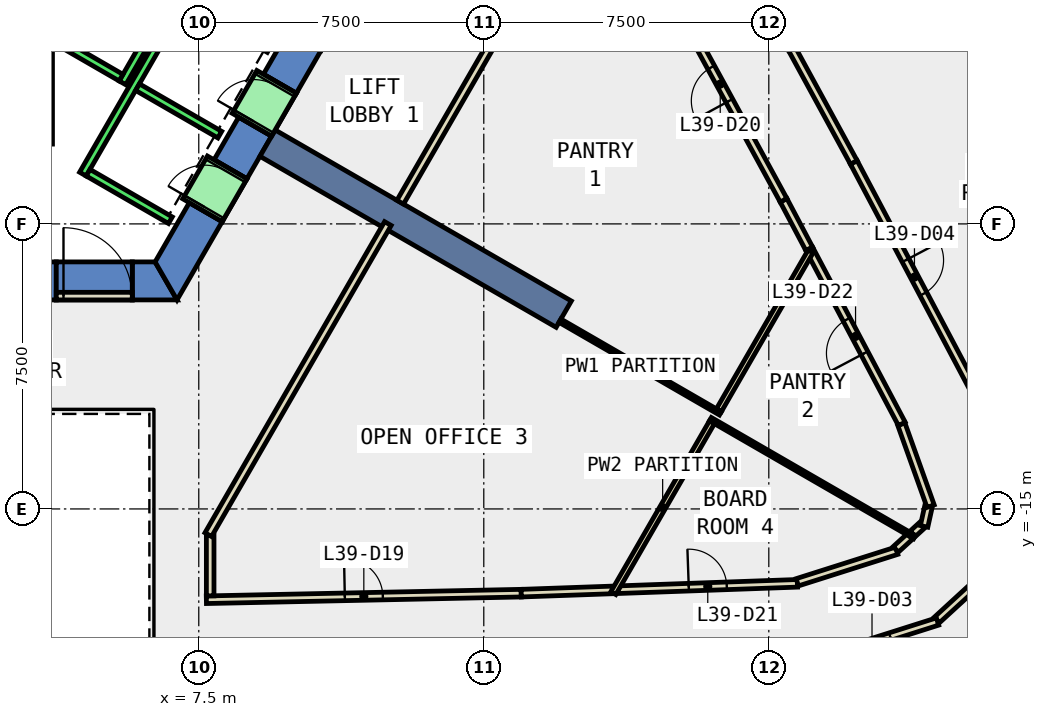
"""IFC4 building model, lengths in metres.
Left out: names, types, materials, properties, quantities, classifications, styles, units other than length and angle.
Written with IfcOpenShell. Run it as: python <this file> out.ifc"""

import sys

from ifc_helpers import new_model, si_unit, direction, frame, frame_2d, origin, place, context, subcontext, project, spatial, polyline, rectangle, outline, extrude, element, fill, save


model = new_model("IFC4")
c1 = context("Model", 3, precision=1e-05, world=origin(), true_north=direction((0.0, 1.0)))
c2 = subcontext(c1, "Body", "Model", "MODEL_VIEW")
j1 = project(units=[si_unit("LENGTHUNIT", "METRE"), si_unit("PLANEANGLEUNIT", "RADIAN")], contexts=[c1])
p1 = place(None, origin())
s1 = spatial("IfcSite", under=j1, at=p1, CompositionType="ELEMENT")
p2 = place(p1, origin())
s2 = spatial("IfcBuilding", under=s1, at=p2, CompositionType="ELEMENT")
p3 = place(p2, frame((0.0, 0.0, 176.0)))
s3 = spatial("IfcBuildingStorey", under=s2, at=p3, CompositionType="ELEMENT", Elevation=176.0)
p4 = place(p3, frame((0.0, 0.0, -0.4)))
e1 = element("IfcWall", 1, at=p4, inside=s3, PredefinedType="SHEAR", context=c2, shape_type="SweptSolid", body=[
    extrude(outline(polyline([(3.75, -9.5), (3.75, -8.5), (-6.351, -8.5), (-6.928, -9.5), (3.75, -9.5)])), origin(), (0.0, 0.0, 1.0), 4.2),
])
p5 = place(p3, frame((0.0, 0.0, -0.4)))
e2 = element("IfcWall", 2, at=p5, inside=s3, PredefinedType="SHEAR", context=c2, shape_type="SweptSolid", body=[
    extrude(outline(polyline([(5.75, -8.5), (5.75, -9.5), (6.928, -9.5), (6.351, -8.5), (5.75, -8.5)])), origin(), (0.0, 0.0, 1.0), 4.2),
])
p6 = place(p3, frame((0.0, 0.0, 3.6)))
e3 = element("IfcWall", 3, at=p6, inside=s3, PredefinedType="SHEAR", context=c2, shape_type="SweptSolid", body=[
    extrude(outline(polyline([(5.75, -9.5), (5.75, -8.5), (3.75, -8.5), (3.75, -9.5), (5.75, -9.5)])), origin(), (0.0, 0.0, 1.0), 0.2),
])
p7 = place(p3, frame((0.0, 0.0, -0.4)))
e4 = element("IfcWall", 4, at=p7, inside=s3, PredefinedType="SHEAR", context=c2, shape_type="SweptSolid", body=[
    extrude(outline(polyline([(8.117, -7.44), (7.252, -6.94), (6.351, -8.5), (6.928, -9.5), (8.117, -7.44)])), origin(), (0.0, 0.0, 1.0), 4.2),
])
p8 = place(p3, frame((0.0, 0.0, -0.4)))
e5 = element("IfcWall", 5, at=p8, inside=s3, PredefinedType="SHEAR", context=c2, shape_type="SweptSolid", body=[
    extrude(outline(polyline([(9.417, -5.189), (8.551, -4.689), (7.902, -5.814), (8.767, -6.314), (9.417, -5.189)])), origin(), (0.0, 0.0, 1.0), 4.2),
])
p9 = place(p3, frame((0.0, 0.0, -0.4)))
e6 = element("IfcWall", 6, at=p9, inside=s3, PredefinedType="SHEAR", context=c2, shape_type="SweptSolid", body=[
    extrude(outline(polyline([(10.717, -2.937), (9.851, -2.437), (9.201, -3.563), (10.067, -4.063), (10.717, -2.937)])), origin(), (0.0, 0.0, 1.0), 4.2),
])
p10 = place(p3, frame((0.0, 0.0, 3.6)))
e7 = element("IfcWall", 7, at=p10, inside=s3, PredefinedType="SHEAR", context=c2, shape_type="SweptSolid", body=[
    extrude(outline(polyline([(8.767, -6.314), (7.902, -5.814), (7.252, -6.94), (8.117, -7.44), (8.767, -6.314)])), origin(), (0.0, 0.0, 1.0), 0.2),
])
p11 = place(p3, frame((0.0, 0.0, 3.6)))
e8 = element("IfcWall", 8, at=p11, inside=s3, PredefinedType="SHEAR", context=c2, shape_type="SweptSolid", body=[
    extrude(outline(polyline([(10.067, -4.063), (9.201, -3.563), (8.551, -4.689), (9.417, -5.189), (10.067, -4.063)])), origin(), (0.0, 0.0, 1.0), 0.2),
])
p12 = place(p3, frame((9.31, -5.375, -0.4), z_axis=(0.0, 0.0, 1.0), x_axis=(0.866017533419, -0.500013631625, 0.0)))
e9 = element("IfcWall", 9, at=p12, inside=s3, PredefinedType="SHEAR", context=c2, shape_type="SweptSolid", body=[
    extrude(rectangle(XDim=9.0, YDim=0.8, at=frame_2d((4.5, 0.0))), origin(), (0.0, 0.0, 1.0), 4.2),
])
p13 = place(p3, frame((7.7, -17.389, 0.0), z_axis=(0.0, 0.0, 1.0), x_axis=(0.999782442794, 0.020858261713, 0.0)))
e10 = element("IfcWall", 10, at=p13, inside=s3, PredefinedType="PARTITIONING", context=c2, shape_type="SweptSolid", body=[
    extrude(rectangle(XDim=8.287, YDim=0.2, at=frame_2d((4.144, 0.0))), origin(), (0.0, 0.0, 1.0), 3.75),
])
p14 = place(p13, frame((3.644, 0.0, 0.0)))
e11 = element("IfcOpeningElement", 11, at=p14, cuts=e10, PredefinedType="OPENING", context=c2, shape_type="SweptSolid", body=[
    extrude(rectangle(XDim=1.0, YDim=2.1, at=frame_2d((0.5, 1.05))), frame((0.0, 0.11, 0.0), z_axis=(0.0, -1.0, 0.0), x_axis=(1.0, 0.0, 0.0)), (0.0, 0.0, 1.0), 0.22),
])
p15 = place(p3, frame((15.985, -17.216, 0.0), z_axis=(0.0, 0.0, 1.0), x_axis=(0.999373434249, 0.035394052017, 0.0)))
e12 = element("IfcWall", 12, at=p15, inside=s3, PredefinedType="PARTITIONING", context=c2, shape_type="SweptSolid", body=[
    extrude(rectangle(XDim=2.4, YDim=0.2, at=frame_2d((1.2, 0.0))), origin(), (0.0, 0.0, 1.0), 3.75),
])
p16 = place(p3, frame((23.565, -8.158, 0.0), z_axis=(0.0, 0.0, 1.0), x_axis=(-0.46753134131, 0.883976495668, 0.0)))
e13 = element("IfcWall", 13, at=p16, inside=s3, PredefinedType="PARTITIONING", context=c2, shape_type="SweptSolid", body=[
    extrude(rectangle(XDim=1.448, YDim=0.2, at=frame_2d((0.724, 0.0))), origin(), (0.0, 0.0, 1.0), 3.75),
])
p17 = place(p3, frame((22.888, -6.878, 0.0), z_axis=(0.0, 0.0, 1.0), x_axis=(-0.478665365973, 0.877997418799, 0.0)))
e14 = element("IfcWall", 14, at=p17, inside=s3, PredefinedType="PARTITIONING", context=c2, shape_type="SweptSolid", body=[
    extrude(rectangle(XDim=6.961, YDim=0.2, at=frame_2d((3.48, 0.0))), origin(), (0.0, 0.0, 1.0), 3.75),
])
p18 = place(p17, frame((2.981, 0.0, 0.0)))
e15 = element("IfcOpeningElement", 15, at=p18, cuts=e14, PredefinedType="OPENING", context=c2, shape_type="SweptSolid", body=[
    extrude(rectangle(XDim=1.0, YDim=2.1, at=frame_2d((0.5, 1.05))), frame((0.0, 0.11, 0.0), z_axis=(0.0, -1.0, 0.0), x_axis=(1.0, 0.0, 0.0)), (0.0, 0.0, 1.0), 0.22),
])
p19 = place(p3, frame((18.534, -17.125, 0.0), z_axis=(0.0, 0.0, 1.0), x_axis=(0.999367128298, 0.035571658351, 0.0)))
e16 = element("IfcWall", 16, at=p19, inside=s3, PredefinedType="PARTITIONING", context=c2, shape_type="SweptSolid", body=[
    extrude(rectangle(XDim=4.722, YDim=0.2, at=frame_2d((2.361, 0.0))), origin(), (0.0, 0.0, 1.0), 3.75),
])
p20 = place(p19, frame((1.861, 0.0, 0.0)))
e17 = element("IfcOpeningElement", 17, at=p20, cuts=e16, PredefinedType="OPENING", context=c2, shape_type="SweptSolid", body=[
    extrude(rectangle(XDim=1.0, YDim=2.1, at=frame_2d((0.5, 1.05))), frame((0.0, 0.11, 0.0), z_axis=(0.0, -1.0, 0.0), x_axis=(1.0, 0.0, 0.0)), (0.0, 0.0, 1.0), 0.22),
])
p21 = place(p3, frame((23.249, -16.93, 0.0), z_axis=(0.0, 0.0, 1.0), x_axis=(0.953158072423, 0.302472625167, 0.0)))
e18 = element("IfcWall", 18, at=p21, inside=s3, PredefinedType="PARTITIONING", context=c2, shape_type="SweptSolid", body=[
    extrude(rectangle(XDim=2.743, YDim=0.2, at=frame_2d((1.372, 0.0))), origin(), (0.0, 0.0, 1.0), 3.75),
])
p22 = place(p3, frame((25.842, -16.063, 0.0), z_axis=(0.0, 0.0, 1.0), x_axis=(0.738222400631, 0.674557400972, 0.0)))
e19 = element("IfcWall", 19, at=p22, inside=s3, PredefinedType="PARTITIONING", context=c2, shape_type="SweptSolid", body=[
    extrude(rectangle(XDim=0.502, YDim=0.2, at=frame_2d((0.251, 0.0))), origin(), (0.0, 0.0, 1.0), 3.75),
])
p23 = place(p3, frame((26.286, -15.656, 0.0), z_axis=(0.0, 0.0, 1.0), x_axis=(0.73763613927, 0.675198434568, 0.0)))
e20 = element("IfcWall", 20, at=p23, inside=s3, PredefinedType="PARTITIONING", context=c2, shape_type="SweptSolid", body=[
    extrude(rectangle(XDim=0.336, YDim=0.2, at=frame_2d((0.168, 0.0))), origin(), (0.0, 0.0, 1.0), 3.75),
])
p24 = place(p3, frame((26.586, -15.459, 0.0), z_axis=(0.0, 0.0, 1.0), x_axis=(0.215832999607, 0.976430292586, 0.0)))
e21 = element("IfcWall", 21, at=p24, inside=s3, PredefinedType="PARTITIONING", context=c2, shape_type="SweptSolid", body=[
    extrude(rectangle(XDim=0.542, YDim=0.2, at=frame_2d((0.271, 0.0))), origin(), (0.0, 0.0, 1.0), 3.75),
])
p25 = place(p3, frame((26.758, -14.926, 0.0), z_axis=(0.0, 0.0, 1.0), x_axis=(-0.33645112914, 0.941700927949, 0.0)))
e22 = element("IfcWall", 22, at=p25, inside=s3, PredefinedType="PARTITIONING", context=c2, shape_type="SweptSolid", body=[
    extrude(rectangle(XDim=2.292, YDim=0.2, at=frame_2d((1.146, 0.0))), origin(), (0.0, 0.0, 1.0), 3.75),
])
p26 = place(p3, frame((26.0, -12.762, 0.0), z_axis=(0.0, 0.0, 1.0), x_axis=(-0.467534471159, 0.883974840297, 0.0)))
e23 = element("IfcWall", 23, at=p26, inside=s3, PredefinedType="PARTITIONING", context=c2, shape_type="SweptSolid", body=[
    extrude(rectangle(XDim=5.208, YDim=0.2, at=frame_2d((2.604, 0.0))), origin(), (0.0, 0.0, 1.0), 3.75),
])
p27 = place(p26, frame((2.104, 0.0, 0.0)))
e24 = element("IfcOpeningElement", 24, at=p27, cuts=e23, PredefinedType="OPENING", context=c2, shape_type="SweptSolid", body=[
    extrude(rectangle(XDim=1.0, YDim=2.1, at=frame_2d((0.5, 1.05))), frame((0.0, 0.11, 0.0), z_axis=(0.0, -1.0, 0.0), x_axis=(1.0, 0.0, 0.0)), (0.0, 0.0, 1.0), 0.22),
])
p28 = place(p3, frame((28.588, -16.395, 0.0), z_axis=(0.0, 0.0, 1.0), x_axis=(-0.737118331834, -0.675763690112, 0.0)))
e25 = element("IfcWall", 25, at=p28, inside=s3, PredefinedType="PARTITIONING", context=c2, shape_type="SweptSolid", body=[
    extrude(rectangle(XDim=2.264, YDim=0.2, at=frame_2d((1.132, 0.0))), origin(), (0.0, 0.0, 1.0), 3.75),
])
p29 = place(p3, frame((26.94, -17.962, 0.0), z_axis=(0.0, 0.0, 1.0), x_axis=(-0.953197442309, -0.302348533941, 0.0)))
e26 = element("IfcWall", 26, at=p29, inside=s3, PredefinedType="PARTITIONING", context=c2, shape_type="SweptSolid", body=[
    extrude(rectangle(XDim=3.618, YDim=0.2, at=frame_2d((1.809, 0.0))), origin(), (0.0, 0.0, 1.0), 3.75),
])
p30 = place(p29, frame((1.309, 0.0, 0.0)))
e27 = element("IfcOpeningElement", 27, at=p30, cuts=e26, PredefinedType="OPENING", context=c2, shape_type="SweptSolid", body=[
    extrude(rectangle(XDim=1.0, YDim=2.1, at=frame_2d((0.5, 1.05))), frame((0.0, 0.11, 0.0), z_axis=(0.0, -1.0, 0.0), x_axis=(1.0, 0.0, 0.0)), (0.0, 0.0, 1.0), 0.22),
])
p31 = place(p3, frame((23.102, -2.884, 0.0), z_axis=(0.0, 0.0, 1.0), x_axis=(0.478646929322, -0.878007469815, 0.0)))
e28 = element("IfcWall", 28, at=p31, inside=s3, PredefinedType="PARTITIONING", context=c2, shape_type="SweptSolid", body=[
    extrude(rectangle(XDim=3.418, YDim=0.2, at=frame_2d((1.709, 0.0))), origin(), (0.0, 0.0, 1.0), 3.75),
])
p32 = place(p3, frame((24.738, -5.885, 0.0), z_axis=(0.0, 0.0, 1.0), x_axis=(0.467616297571, -0.883931557444, 0.0)))
e29 = element("IfcWall", 29, at=p32, inside=s3, PredefinedType="PARTITIONING", context=c2, shape_type="SweptSolid", body=[
    extrude(rectangle(XDim=6.82, YDim=0.2, at=frame_2d((3.41, 0.0))), origin(), (0.0, 0.0, 1.0), 3.75),
])
p33 = place(p32, frame((2.91, 0.0, 0.0)))
e30 = element("IfcOpeningElement", 30, at=p33, cuts=e29, PredefinedType="OPENING", context=c2, shape_type="SweptSolid", body=[
    extrude(rectangle(XDim=1.0, YDim=2.1, at=frame_2d((0.5, 1.05))), frame((0.0, 0.11, 0.0), z_axis=(0.0, -1.0, 0.0), x_axis=(1.0, 0.0, 0.0)), (0.0, 0.0, 1.0), 0.22),
])
p34 = place(p3, frame((7.8, -15.69, 0.0), z_axis=(0.0, 0.0, 1.0), x_axis=(0.0, -1.0, 0.0)))
e31 = element("IfcWall", 31, at=p34, inside=s3, PredefinedType="PARTITIONING", context=c2, shape_type="SweptSolid", body=[
    extrude(rectangle(XDim=1.597, YDim=0.2, at=frame_2d((0.799, 0.0))), origin(), (0.0, 0.0, 1.0), 3.75),
])
p35 = place(p3, frame((12.476, -7.491, 0.0), z_axis=(0.0, 0.0, 1.0), x_axis=(-0.499989258007, -0.866031605588, 0.0)))
e32 = element("IfcWall", 32, at=p35, inside=s3, PredefinedType="PARTITIONING", context=c2, shape_type="SweptSolid", body=[
    extrude(rectangle(XDim=9.452, YDim=0.2, at=frame_2d((4.726, 0.0))), origin(), (0.0, 0.0, 1.0), 3.75),
])
p36 = place(p3, frame((18.03, 2.13, 0.0), z_axis=(0.0, 0.0, 1.0), x_axis=(-0.499919790729, -0.866071707676, 0.0)))
e33 = element("IfcWall", 33, at=p36, inside=s3, PredefinedType="PARTITIONING", context=c2, shape_type="SweptSolid", body=[
    extrude(rectangle(XDim=10.46, YDim=0.2, at=frame_2d((5.23, 0.0))), origin(), (0.0, 0.0, 1.0), 3.75),
])
p37 = place(p3, frame((17.004, -10.047, 0.0), z_axis=(0.0, 0.0, 1.0), x_axis=(0.865997117979, -0.500048989253, 0.0)))
e34 = element("IfcWall", 34, at=p37, inside=s3, PredefinedType="PARTITIONING", context=c2, shape_type="SweptSolid", body=[
    extrude(rectangle(XDim=4.875, YDim=0.1, at=frame_2d((2.438, 0.0))), origin(), (0.0, 0.0, 1.0), 3.75),
])
p38 = place(p3, frame((21.004, -12.719, 0.0), z_axis=(0.0, 0.0, 1.0), x_axis=(-0.499877157623, -0.866096315249, 0.0)))
e35 = element("IfcWall", 35, at=p38, inside=s3, PredefinedType="PARTITIONING", context=c2, shape_type="SweptSolid", body=[
    extrude(rectangle(XDim=5.191, YDim=0.15, at=frame_2d((2.596, 0.0))), origin(), (0.0, 0.0, 1.0), 3.75),
])
p39 = place(p3, frame((23.6, -8.224, 0.0), z_axis=(0.0, 0.0, 1.0), x_axis=(-0.500120854176, -0.865955617349, 0.0)))
e36 = element("IfcWall", 36, at=p39, inside=s3, PredefinedType="PARTITIONING", context=c2, shape_type="SweptSolid", body=[
    extrude(rectangle(XDim=4.827, YDim=0.15, at=frame_2d((2.414, 0.0))), origin(), (0.0, 0.0, 1.0), 3.75),
])
p40 = place(p3, frame((20.964, -12.638, 0.0), z_axis=(0.0, 0.0, 1.0), x_axis=(0.865981737723, -0.500075624211, 0.0)))
e37 = element("IfcWall", 37, at=p40, inside=s3, PredefinedType="PARTITIONING", context=c2, shape_type="SweptSolid", body=[
    extrude(rectangle(XDim=6.203, YDim=0.1, at=frame_2d((3.102, 0.0))), origin(), (0.0, 0.0, 1.0), 3.75),
])
p41 = place(p3, frame((3.75, -9.4, 0.0), z_axis=(0.0, 0.0, 1.0), x_axis=(1.0, 0.0, 0.0)))
e38 = element("IfcWall", 38, at=p41, inside=s3, PredefinedType="PARTITIONING", context=c2, shape_type="SweptSolid", body=[
    extrude(rectangle(XDim=2.0, YDim=0.2, at=frame_2d((1.0, 0.0))), origin(), (0.0, 0.0, 1.0), 2.4),
])
p42 = place(p41, frame((0.19, 0.0, 0.0)))
e39 = element("IfcOpeningElement", 39, at=p42, cuts=e38, PredefinedType="OPENING", context=c2, shape_type="SweptSolid", body=[
    extrude(rectangle(XDim=1.8, YDim=2.1, at=frame_2d((0.9, 1.05))), frame((0.0, 0.11, 0.0), z_axis=(0.0, -1.0, 0.0), x_axis=(1.0, 0.0, 0.0)), (0.0, 0.0, 1.0), 0.22),
])
p43 = place(p3, frame((5.492, -3.788, 0.0), z_axis=(0.0, 0.0, 1.0), x_axis=(0.500011755427, 0.866018616679, 0.0)))
e40 = element("IfcWall", 40, at=p43, inside=s3, PredefinedType="STANDARD", context=c2, shape_type="SweptSolid", body=[
    extrude(rectangle(XDim=2.8, YDim=0.2, at=frame_2d((1.4, 0.0))), origin(), (0.0, 0.0, 1.0), 3.75),
])
p44 = place(p3, frame((3.377, -2.452, 0.0), z_axis=(0.0, 0.0, 1.0), x_axis=(0.865955154139, -0.50012165622, 0.0)))
e41 = element("IfcWall", 41, at=p44, inside=s3, PredefinedType="STANDARD", context=c2, shape_type="SweptSolid", body=[
    extrude(rectangle(XDim=2.4, YDim=0.2, at=frame_2d((1.2, 0.0))), origin(), (0.0, 0.0, 1.0), 3.75),
])
p45 = place(p3, frame((4.451, -6.19, 0.0), z_axis=(0.0, 0.0, 1.0), x_axis=(0.50000090737, 0.866024879913, 0.0)))
e42 = element("IfcWall", 42, at=p45, inside=s3, PredefinedType="STANDARD", context=c2, shape_type="SweptSolid", body=[
    extrude(rectangle(XDim=10.6, YDim=0.2, at=frame_2d((5.3, 0.0))), origin(), (0.0, 0.0, 1.0), 3.75),
])
for number, where, z_axis, x_axis in (
    (43, (4.588, -6.153, 0.0), (0.0, 0.0, 1.0), (0.866, -0.5, 0.0)),
    (44, (5.888, -3.902, 0.0), (0.0, 0.0, 1.0), (0.866, -0.5, 0.0)),
):
    element("IfcWall", number, at=place(p3, frame(where, z_axis=z_axis, x_axis=x_axis)), inside=s3, PredefinedType="STANDARD", context=c2, shape_type="SweptSolid", body=[
        extrude(rectangle(XDim=2.5, YDim=0.2, at=frame_2d((1.25, 0.0))), origin(), (0.0, 0.0, 1.0), 3.75),
    ])
p46 = place(p3, frame((7.598, -7.14, 0.0), z_axis=(0.0, 0.0, 1.0), x_axis=(0.500362116554, 0.865816234728, 0.0)))
e45 = element("IfcWall", 45, at=p46, inside=s3, PredefinedType="STANDARD", context=c2, shape_type="SweptSolid", body=[
    extrude(rectangle(XDim=1.299, YDim=1.2, at=frame_2d((0.65, 0.0))), origin(), (0.0, 0.0, 1.0), 2.4),
])
p47 = place(p46, frame((0.1, 0.0, 0.0)))
e46 = element("IfcOpeningElement", 46, at=p47, cuts=e45, PredefinedType="OPENING", context=c2, shape_type="SweptSolid", body=[
    extrude(rectangle(XDim=1.1, YDim=2.3, at=frame_2d((0.55, 1.15))), frame((0.0, 0.61, 0.0), z_axis=(0.0, -1.0, 0.0), x_axis=(1.0, 0.0, 0.0)), (0.0, 0.0, 1.0), 1.22),
])
p48 = place(p3, frame((8.898, -4.889, 0.0), z_axis=(0.0, 0.0, 1.0), x_axis=(0.500036693733, 0.866004217611, 0.0)))
e47 = element("IfcWall", 47, at=p48, inside=s3, PredefinedType="STANDARD", context=c2, shape_type="SweptSolid", body=[
    extrude(rectangle(XDim=1.3, YDim=1.2, at=frame_2d((0.65, 0.0))), origin(), (0.0, 0.0, 1.0), 2.4),
])
p49 = place(p48, frame((0.1, 0.0, 0.0)))
e48 = element("IfcOpeningElement", 48, at=p49, cuts=e47, PredefinedType="OPENING", context=c2, shape_type="SweptSolid", body=[
    extrude(rectangle(XDim=1.1, YDim=2.3, at=frame_2d((0.55, 1.15))), frame((0.0, 0.61, 0.0), z_axis=(0.0, -1.0, 0.0), x_axis=(1.0, 0.0, 0.0)), (0.0, 0.0, 1.0), 1.22),
])
p50 = place(p3, frame((3.55, -2.667, 0.0), z_axis=(0.0, 0.0, 1.0), x_axis=(0.0, -1.0, 0.0)))
e49 = element("IfcWall", 49, at=p50, inside=s3, PredefinedType="STANDARD", context=c2, shape_type="SweptSolid", body=[
    extrude(rectangle(XDim=2.733, YDim=0.2, at=frame_2d((1.366, 0.0))), origin(), (0.0, 0.0, 1.0), 3.75),
])
p51 = place(p30, origin())
e50 = element("IfcDoor", 50, at=p51, inside=s3, OperationType="SINGLE_SWING_LEFT", PredefinedType="DOOR", context=c2, shape_type="SweptSolid", body=[
    extrude(rectangle(XDim=1.0, YDim=2.1, at=frame_2d((0.5, 1.05))), frame((0.0, 0.025, 0.0), z_axis=(0.0, -1.0, 0.0), x_axis=(1.0, 0.0, 0.0)), (0.0, 0.0, 1.0), 0.05),
])
fill(e27, e50)
p52 = place(p33, origin())
e51 = element("IfcDoor", 51, at=p52, inside=s3, OperationType="SINGLE_SWING_LEFT", PredefinedType="DOOR", context=c2, shape_type="SweptSolid", body=[
    extrude(rectangle(XDim=1.0, YDim=2.1, at=frame_2d((0.5, 1.05))), frame((0.0, 0.025, 0.0), z_axis=(0.0, -1.0, 0.0), x_axis=(1.0, 0.0, 0.0)), (0.0, 0.0, 1.0), 0.05),
])
fill(e30, e51)
p53 = place(p14, origin())
e52 = element("IfcDoor", 52, at=p53, inside=s3, OperationType="SINGLE_SWING_RIGHT", PredefinedType="DOOR", context=c2, shape_type="SweptSolid", body=[
    extrude(rectangle(XDim=1.0, YDim=2.1, at=frame_2d((0.5, 1.05))), frame((0.0, 0.025, 0.0), z_axis=(0.0, -1.0, 0.0), x_axis=(1.0, 0.0, 0.0)), (0.0, 0.0, 1.0), 0.05),
])
fill(e11, e52)
p54 = place(p18, origin())
e53 = element("IfcDoor", 53, at=p54, inside=s3, OperationType="SINGLE_SWING_LEFT", PredefinedType="DOOR", context=c2, shape_type="SweptSolid", body=[
    extrude(rectangle(XDim=1.0, YDim=2.1, at=frame_2d((0.5, 1.05))), frame((0.0, 0.025, 0.0), z_axis=(0.0, -1.0, 0.0), x_axis=(1.0, 0.0, 0.0)), (0.0, 0.0, 1.0), 0.05),
])
fill(e15, e53)
p55 = place(p20, origin())
e54 = element("IfcDoor", 54, at=p55, inside=s3, OperationType="SINGLE_SWING_LEFT", PredefinedType="DOOR", context=c2, shape_type="SweptSolid", body=[
    extrude(rectangle(XDim=1.0, YDim=2.1, at=frame_2d((0.5, 1.05))), frame((0.0, 0.025, 0.0), z_axis=(0.0, -1.0, 0.0), x_axis=(1.0, 0.0, 0.0)), (0.0, 0.0, 1.0), 0.05),
])
fill(e17, e54)
p56 = place(p27, origin())
e55 = element("IfcDoor", 55, at=p56, inside=s3, OperationType="SINGLE_SWING_LEFT", PredefinedType="DOOR", context=c2, shape_type="SweptSolid", body=[
    extrude(rectangle(XDim=1.0, YDim=2.1, at=frame_2d((0.5, 1.05))), frame((0.0, 0.025, 0.0), z_axis=(0.0, -1.0, 0.0), x_axis=(1.0, 0.0, 0.0)), (0.0, 0.0, 1.0), 0.05),
])
fill(e24, e55)
p57 = place(p42, origin())
e56 = element("IfcDoor", 56, at=p57, inside=s3, OperationType="DOUBLE_DOOR_SINGLE_SWING", PredefinedType="DOOR", context=c2, shape_type="SweptSolid", body=[
    extrude(rectangle(XDim=1.8, YDim=2.1, at=frame_2d((0.9, 1.05))), frame((0.0, 0.025, 0.0), z_axis=(0.0, -1.0, 0.0), x_axis=(1.0, 0.0, 0.0)), (0.0, 0.0, 1.0), 0.05),
])
fill(e39, e56)
p58 = place(p47, origin())
e57 = element("IfcDoor", 57, at=p58, inside=s3, OperationType="SLIDING_TO_LEFT", PredefinedType="DOOR", context=c2, shape_type="SweptSolid", body=[
    extrude(rectangle(XDim=1.1, YDim=2.3, at=frame_2d((0.55, 1.15))), frame((0.0, 0.025, 0.0), z_axis=(0.0, -1.0, 0.0), x_axis=(1.0, 0.0, 0.0)), (0.0, 0.0, 1.0), 0.05),
])
fill(e46, e57)
p59 = place(p49, origin())
e58 = element("IfcDoor", 58, at=p59, inside=s3, OperationType="SLIDING_TO_LEFT", PredefinedType="DOOR", context=c2, shape_type="SweptSolid", body=[
    extrude(rectangle(XDim=1.1, YDim=2.3, at=frame_2d((0.55, 1.15))), frame((0.0, 0.025, 0.0), z_axis=(0.0, -1.0, 0.0), x_axis=(1.0, 0.0, 0.0)), (0.0, 0.0, 1.0), 0.05),
])
fill(e48, e58)
save(model, sys.argv[1])
